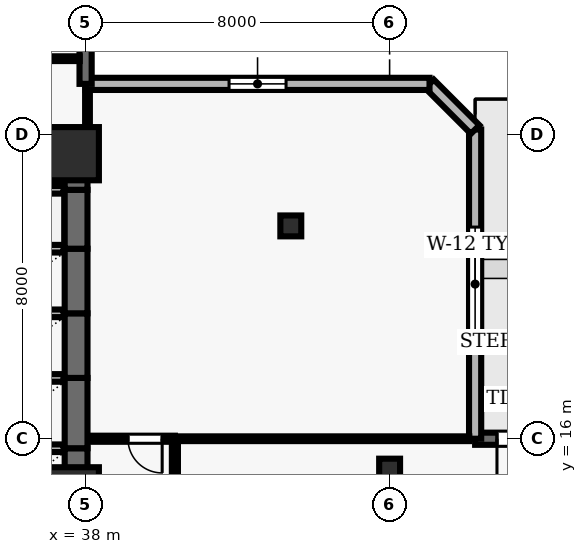
"""IFC4 building model, lengths in metres.
Left out: names, types, materials, properties, quantities, classifications, styles, units other than length and angle.
Written with IfcOpenShell. Run it as: python <this file> out.ifc"""

import sys

from ifc_helpers import new_model, si_unit, direction, frame, frame_2d, origin, origin_2d, place, context, subcontext, project, spatial, rectangle, hollow_rectangle, extrude, element, fill, save


model = new_model("IFC4")
c1 = context("Model", 3, precision=1e-05, world=origin(), true_north=direction((0.0, 1.0)))
c2 = subcontext(c1, "Body", "Model", "MODEL_VIEW")
j1 = project(units=[si_unit("LENGTHUNIT", "METRE"), si_unit("PLANEANGLEUNIT", "RADIAN")], contexts=[c1])
p1 = place(None, origin())
s1 = spatial("IfcSite", under=j1, at=p1, CompositionType="ELEMENT")
p2 = place(p1, origin())
s2 = spatial("IfcBuilding", under=s1, at=p2, CompositionType="ELEMENT")
p3 = place(p2, frame((0.0, 0.0, 77.8)))
s3 = spatial("IfcBuildingStorey", under=s2, at=p3, CompositionType="ELEMENT", Elevation=77.8)
for number, where, z_axis, x_axis in (
    (1, (37.65, 14.55, 0.0), (0.0, 0.0, 1.0), (1.0, 0.0, 0.0)),
    (2, (37.65, 23.5, 0.0), (0.0, 0.0, 1.0), (1.0, 0.0, 0.0)),
):
    element("IfcColumn", number, at=place(p3, frame(where, z_axis=z_axis, x_axis=x_axis)), inside=s3, PredefinedType="COLUMN", context=c2, shape_type="SweptSolid", body=[
        extrude(rectangle(XDim=1.4, YDim=1.4, at=origin_2d()), origin(), (0.0, 0.0, 1.0), 3.9),
    ])
for number, where, z_axis, x_axis in (
    (3, (46.0, 15.2, 0.0), (0.0, 0.0, 1.0), (1.0, 0.0, 0.0)),
    (4, (43.4, 21.6, 0.0), (0.0, 0.0, 1.0), (1.0, 0.0, 0.0)),
):
    element("IfcColumn", number, at=place(p3, frame(where, z_axis=z_axis, x_axis=x_axis)), inside=s3, PredefinedType="COLUMN", context=c2, shape_type="SweptSolid", body=[
        extrude(hollow_rectangle(XDim=0.55, YDim=0.55, WallThickness=0.025, at=origin_2d()), origin(), (0.0, 0.0, 1.0), 3.9),
    ])
p4 = place(p3, frame((73.5, 16.0, 0.0), z_axis=(0.0, 0.0, 1.0), x_axis=(-1.0, 0.0, 0.0)))
e5 = element("IfcWall", 5, at=p4, inside=s3, PredefinedType="SOLIDWALL", context=c2, shape_type="SweptSolid", body=[
    extrude(rectangle(XDim=25.25, YDim=0.32, at=frame_2d((12.625, 0.0))), origin(), (0.0, 0.0, 1.0), 3.69),
])
p5 = place(p4, frame((12.4, 0.0, 0.0)))
e6 = element("IfcOpeningElement", 6, at=p5, cuts=e5, PredefinedType="OPENING", context=c2, shape_type="SweptSolid", body=[
    extrude(rectangle(XDim=1.0, YDim=2.2, at=frame_2d((0.5, 1.1))), frame((0.0, 0.17, 0.0), z_axis=(0.0, -1.0, 0.0), x_axis=(1.0, 0.0, 0.0)), (0.0, 0.0, 1.0), 0.34),
])
p6 = place(p4, frame((23.325, 0.0, 0.0)))
e7 = element("IfcOpeningElement", 7, at=p6, cuts=e5, PredefinedType="OPENING", context=c2, shape_type="SweptSolid", body=[
    extrude(rectangle(XDim=1.35, YDim=2.2, at=frame_2d((0.675, 1.1))), frame((0.0, 0.17, 0.0), z_axis=(0.0, -1.0, 0.0), x_axis=(1.0, 0.0, 0.0)), (0.0, 0.0, 1.0), 0.34),
])
p7 = place(p4, frame((1.956, 0.0, 0.9)))
e8 = element("IfcOpeningElement", 8, at=p7, cuts=e5, PredefinedType="OPENING", context=c2, shape_type="SweptSolid", body=[
    extrude(rectangle(XDim=2.4, YDim=2.2, at=frame_2d((1.2, 1.1))), frame((0.0, 0.17, 0.0), z_axis=(0.0, -1.0, 0.0), x_axis=(1.0, 0.0, 0.0)), (0.0, 0.0, 1.0), 0.34),
])
p8 = place(p3, frame((48.25, 16.0, 0.0), z_axis=(0.0, 0.0, 1.0), x_axis=(0.0, 1.0, 0.0)))
e9 = element("IfcWall", 9, at=p8, inside=s3, PredefinedType="SOLIDWALL", context=c2, shape_type="SweptSolid", body=[
    extrude(rectangle(XDim=8.137, YDim=0.32, at=frame_2d((4.068, 0.0))), origin(), (0.0, 0.0, 1.0), 3.69),
])
p9 = place(p8, frame((2.569, 0.0, 0.9)))
e10 = element("IfcOpeningElement", 10, at=p9, cuts=e9, PredefinedType="OPENING", context=c2, shape_type="SweptSolid", body=[
    extrude(rectangle(XDim=3.0, YDim=2.2, at=frame_2d((1.5, 1.1))), frame((0.0, 0.17, 0.0), z_axis=(0.0, -1.0, 0.0), x_axis=(1.0, 0.0, 0.0)), (0.0, 0.0, 1.0), 0.34),
])
p10 = place(p3, frame((48.25, 24.137, 0.0), z_axis=(0.0, 0.0, 1.0), x_axis=(-0.707106781187, 0.707106781187, 0.0)))
e11 = element("IfcWall", 11, at=p10, inside=s3, PredefinedType="SOLIDWALL", context=c2, shape_type="SweptSolid", body=[
    extrude(rectangle(XDim=1.697, YDim=0.32, at=frame_2d((0.849, 0.0))), origin(), (0.0, 0.0, 1.0), 3.69),
])
p11 = place(p3, frame((47.05, 25.337, 0.0), z_axis=(0.0, 0.0, 1.0), x_axis=(-1.0, 0.0, 0.0)))
e12 = element("IfcWall", 12, at=p11, inside=s3, PredefinedType="SOLIDWALL", context=c2, shape_type="SweptSolid", body=[
    extrude(rectangle(XDim=9.05, YDim=0.32, at=frame_2d((4.525, 0.0))), origin(), (0.0, 0.0, 1.0), 3.69),
])
p12 = place(p11, frame((3.775, 0.0, 0.9)))
e13 = element("IfcOpeningElement", 13, at=p12, cuts=e12, PredefinedType="OPENING", context=c2, shape_type="SweptSolid", body=[
    extrude(rectangle(XDim=1.5, YDim=1.6, at=frame_2d((0.75, 0.8))), frame((0.0, 0.17, 0.0), z_axis=(0.0, -1.0, 0.0), x_axis=(1.0, 0.0, 0.0)), (0.0, 0.0, 1.0), 0.34),
])
p13 = place(p3, frame((38.0, 25.337, 0.0), z_axis=(0.0, 0.0, 1.0), x_axis=(0.0, 1.0, 0.0)))
e14 = element("IfcWall", 14, at=p13, inside=s3, PredefinedType="SOLIDWALL", context=c2, shape_type="SweptSolid", body=[
    extrude(rectangle(XDim=26.163, YDim=0.32, at=frame_2d((13.082, 0.0))), origin(), (0.0, 0.0, 1.0), 3.69),
])
p14 = place(p13, frame((13.008, 0.0, 0.0)))
e15 = element("IfcOpeningElement", 15, at=p14, cuts=e14, PredefinedType="OPENING", context=c2, shape_type="SweptSolid", body=[
    extrude(rectangle(XDim=1.0, YDim=2.2, at=frame_2d((0.5, 1.1))), frame((0.0, 0.17, 0.0), z_axis=(0.0, -1.0, 0.0), x_axis=(1.0, 0.0, 0.0)), (0.0, 0.0, 1.0), 0.34),
])
p15 = place(p13, frame((1.92, 0.0, 0.9)))
e16 = element("IfcOpeningElement", 16, at=p15, cuts=e14, PredefinedType="OPENING", context=c2, shape_type="SweptSolid", body=[
    extrude(rectangle(XDim=1.8, YDim=1.6, at=frame_2d((0.9, 0.8))), frame((0.0, 0.17, 0.0), z_axis=(0.0, -1.0, 0.0), x_axis=(1.0, 0.0, 0.0)), (0.0, 0.0, 1.0), 0.34),
])
p16 = place(p13, frame((21.993, 0.0, 0.9)))
e17 = element("IfcOpeningElement", 17, at=p16, cuts=e14, PredefinedType="OPENING", context=c2, shape_type="SweptSolid", body=[
    extrude(rectangle(XDim=1.8, YDim=1.6, at=frame_2d((0.9, 0.8))), frame((0.0, 0.17, 0.0), z_axis=(0.0, -1.0, 0.0), x_axis=(1.0, 0.0, 0.0)), (0.0, 0.0, 1.0), 0.34),
])
p17 = place(p3, frame((37.75, 13.9, 0.0), z_axis=(0.0, 0.0, 1.0), x_axis=(0.0, 1.0, 0.0)))
e18 = element("IfcWall", 18, at=p17, inside=s3, PredefinedType="SHEAR", context=c2, shape_type="SweptSolid", body=[
    extrude(rectangle(XDim=1.85, YDim=0.6, at=frame_2d((0.925, 0.0))), origin(), (0.0, 0.0, 1.0), 3.69),
])
p18 = place(p3, frame((37.42, 15.75, 0.0), z_axis=(0.0, 0.0, 1.0), x_axis=(-1.0, 0.0, 0.0)))
e19 = element("IfcWall", 19, at=p18, inside=s3, PredefinedType="SOLIDWALL", context=c2, shape_type="SweptSolid", body=[
    extrude(rectangle(XDim=2.14, YDim=0.2, at=frame_2d((1.07, 0.0))), origin(), (0.0, 0.0, 1.0), 3.69),
])
p19 = place(p3, frame((37.75, 15.75, 0.0), z_axis=(0.0, 0.0, 1.0), x_axis=(0.0, 1.0, 0.0)))
e20 = element("IfcWall", 20, at=p19, inside=s3, PredefinedType="SHEAR", context=c2, shape_type="SweptSolid", body=[
    extrude(rectangle(XDim=1.85, YDim=0.6, at=frame_2d((0.925, 0.0))), origin(), (0.0, 0.0, 1.0), 3.69),
])
p20 = place(p3, frame((37.42, 17.6, 0.0), z_axis=(0.0, 0.0, 1.0), x_axis=(-1.0, 0.0, 0.0)))
e21 = element("IfcWall", 21, at=p20, inside=s3, PredefinedType="SOLIDWALL", context=c2, shape_type="SweptSolid", body=[
    extrude(rectangle(XDim=2.14, YDim=0.2, at=frame_2d((1.07, 0.0))), origin(), (0.0, 0.0, 1.0), 3.69),
])
p21 = place(p3, frame((37.75, 17.6, 0.0), z_axis=(0.0, 0.0, 1.0), x_axis=(0.0, 1.0, 0.0)))
e22 = element("IfcWall", 22, at=p21, inside=s3, PredefinedType="SHEAR", context=c2, shape_type="SweptSolid", body=[
    extrude(rectangle(XDim=1.7, YDim=0.6, at=frame_2d((0.85, 0.0))), origin(), (0.0, 0.0, 1.0), 3.69),
])
p22 = place(p3, frame((37.42, 19.3, 0.0), z_axis=(0.0, 0.0, 1.0), x_axis=(-1.0, 0.0, 0.0)))
e23 = element("IfcWall", 23, at=p22, inside=s3, PredefinedType="SOLIDWALL", context=c2, shape_type="SweptSolid", body=[
    extrude(rectangle(XDim=2.14, YDim=0.2, at=frame_2d((1.07, 0.0))), origin(), (0.0, 0.0, 1.0), 3.69),
])
p23 = place(p3, frame((37.75, 19.3, 0.0), z_axis=(0.0, 0.0, 1.0), x_axis=(0.0, 1.0, 0.0)))
e24 = element("IfcWall", 24, at=p23, inside=s3, PredefinedType="SHEAR", context=c2, shape_type="SweptSolid", body=[
    extrude(rectangle(XDim=1.7, YDim=0.6, at=frame_2d((0.85, 0.0))), origin(), (0.0, 0.0, 1.0), 3.69),
])
p24 = place(p3, frame((37.42, 21.0, 0.0), z_axis=(0.0, 0.0, 1.0), x_axis=(-1.0, 0.0, 0.0)))
e25 = element("IfcWall", 25, at=p24, inside=s3, PredefinedType="SOLIDWALL", context=c2, shape_type="SweptSolid", body=[
    extrude(rectangle(XDim=2.14, YDim=0.2, at=frame_2d((1.07, 0.0))), origin(), (0.0, 0.0, 1.0), 3.69),
])
p25 = place(p3, frame((37.75, 21.0, 0.0), z_axis=(0.0, 0.0, 1.0), x_axis=(0.0, 1.0, 0.0)))
e26 = element("IfcWall", 26, at=p25, inside=s3, PredefinedType="SHEAR", context=c2, shape_type="SweptSolid", body=[
    extrude(rectangle(XDim=1.55, YDim=0.6, at=frame_2d((0.775, 0.0))), origin(), (0.0, 0.0, 1.0), 3.69),
])
p26 = place(p3, frame((37.42, 22.55, 0.0), z_axis=(0.0, 0.0, 1.0), x_axis=(-1.0, 0.0, 0.0)))
e27 = element("IfcWall", 27, at=p26, inside=s3, PredefinedType="SOLIDWALL", context=c2, shape_type="SweptSolid", body=[
    extrude(rectangle(XDim=2.14, YDim=0.2, at=frame_2d((1.07, 0.0))), origin(), (0.0, 0.0, 1.0), 3.69),
])
p27 = place(p3, frame((37.75, 22.55, 0.0), z_axis=(0.0, 0.0, 1.0), x_axis=(0.0, 1.0, 0.0)))
e28 = element("IfcWall", 28, at=p27, inside=s3, PredefinedType="SHEAR", context=c2, shape_type="SweptSolid", body=[
    extrude(rectangle(XDim=1.5, YDim=0.6, at=frame_2d((0.75, 0.0))), origin(), (0.0, 0.0, 1.0), 3.69),
])
p28 = place(p3, frame((37.42, 24.05, 0.0), z_axis=(0.0, 0.0, 1.0), x_axis=(-1.0, 0.0, 0.0)))
e29 = element("IfcWall", 29, at=p28, inside=s3, PredefinedType="SOLIDWALL", context=c2, shape_type="SweptSolid", body=[
    extrude(rectangle(XDim=2.14, YDim=0.2, at=frame_2d((1.07, 0.0))), origin(), (0.0, 0.0, 1.0), 3.69),
])
p29 = place(p3, frame((35.15, 26.0, 0.0), z_axis=(0.0, 0.0, 1.0), x_axis=(1.0, 0.0, 0.0)))
e30 = element("IfcWall", 30, at=p29, inside=s3, PredefinedType="PARTITIONING", context=c2, shape_type="SweptSolid", body=[
    extrude(rectangle(XDim=2.695, YDim=0.125, at=frame_2d((1.348, 0.0))), origin(), (0.0, 0.0, 1.0), 3.69),
])
p30 = place(p3, frame((40.35, 16.0, 0.0), z_axis=(0.0, 0.0, 1.0), x_axis=(1.0, 0.0, 0.0)))
e31 = element("IfcWall", 31, at=p30, inside=s3, PredefinedType="PARTITIONING", context=c2, shape_type="SweptSolid", body=[
    extrude(rectangle(XDim=7.745, YDim=0.125, at=frame_2d((3.873, 0.0))), origin(), (0.0, 0.0, 1.0), 3.39),
])
p31 = place(p3, frame((40.35, 16.0, 0.0), z_axis=(0.0, 0.0, 1.0), x_axis=(-1.0, 0.0, 0.0)))
e32 = element("IfcWall", 32, at=p31, inside=s3, PredefinedType="PARTITIONING", context=c2, shape_type="SweptSolid", body=[
    extrude(rectangle(XDim=2.27, YDim=0.16, at=frame_2d((1.135, 0.0))), origin(), (0.0, 0.0, 1.0), 3.69),
])
p32 = place(p31, frame((0.335, 0.0, 0.0)))
e33 = element("IfcOpeningElement", 33, at=p32, cuts=e32, PredefinedType="OPENING", context=c2, shape_type="SweptSolid", body=[
    extrude(rectangle(XDim=0.9, YDim=2.1, at=frame_2d((0.45, 1.05))), frame((0.0, 0.09, 0.0), z_axis=(0.0, -1.0, 0.0), x_axis=(1.0, 0.0, 0.0)), (0.0, 0.0, 1.0), 0.18),
])
p33 = place(p3, frame((38.05, 25.182, 0.0), z_axis=(0.0, 0.0, 1.0), x_axis=(0.0, -1.0, 0.0)))
e34 = element("IfcWall", 34, at=p33, inside=s3, PredefinedType="PARTITIONING", context=c2, shape_type="SweptSolid", body=[
    extrude(rectangle(XDim=1.132, YDim=0.125, at=frame_2d((0.566, 0.0))), origin(), (0.0, 0.0, 1.0), 2.995),
])
p34 = place(p3, frame((40.35, 10.425, 0.0), z_axis=(0.0, 0.0, 1.0), x_axis=(0.0, 1.0, 0.0)))
e35 = element("IfcWall", 35, at=p34, inside=s3, PredefinedType="PARTITIONING", context=c2, shape_type="SweptSolid", body=[
    extrude(rectangle(XDim=5.5, YDim=0.16, at=frame_2d((2.75, 0.0))), origin(), (0.0, 0.0, 1.0), 3.227),
])
p35 = place(p6, origin())
e36 = element("IfcDoor", 36, at=p35, inside=s3, OperationType="SINGLE_SWING_RIGHT", PredefinedType="DOOR", context=c2, shape_type="SweptSolid", body=[
    extrude(rectangle(XDim=1.35, YDim=2.2, at=frame_2d((0.675, 1.1))), frame((0.0, 0.025, 0.0), z_axis=(0.0, -1.0, 0.0), x_axis=(1.0, 0.0, 0.0)), (0.0, 0.0, 1.0), 0.05),
])
fill(e7, e36)
p36 = place(p9, origin())
e37 = element("IfcWindow", 37, at=p36, inside=s3, PartitioningType="SINGLE_PANEL", PredefinedType="WINDOW", context=c2, shape_type="SweptSolid", body=[
    extrude(rectangle(XDim=3.0, YDim=2.2, at=frame_2d((1.5, 1.1))), frame((0.0, 0.03, 0.0), z_axis=(0.0, -1.0, 0.0), x_axis=(1.0, 0.0, 0.0)), (0.0, 0.0, 1.0), 0.06),
])
fill(e10, e37)
p37 = place(p12, origin())
e38 = element("IfcWindow", 38, at=p37, inside=s3, PartitioningType="SINGLE_PANEL", PredefinedType="WINDOW", context=c2, shape_type="SweptSolid", body=[
    extrude(rectangle(XDim=1.5, YDim=1.6, at=frame_2d((0.75, 0.8))), frame((0.0, 0.03, 0.0), z_axis=(0.0, -1.0, 0.0), x_axis=(1.0, 0.0, 0.0)), (0.0, 0.0, 1.0), 0.06),
])
fill(e13, e38)
p38 = place(p32, origin())
e39 = element("IfcDoor", 39, at=p38, inside=s3, OperationType="SINGLE_SWING_LEFT", PredefinedType="DOOR", context=c2, shape_type="SweptSolid", body=[
    extrude(rectangle(XDim=0.9, YDim=2.1, at=frame_2d((0.45, 1.05))), frame((0.0, 0.025, 0.0), z_axis=(0.0, -1.0, 0.0), x_axis=(1.0, 0.0, 0.0)), (0.0, 0.0, 1.0), 0.05),
])
fill(e33, e39)
save(model, sys.argv[1])
